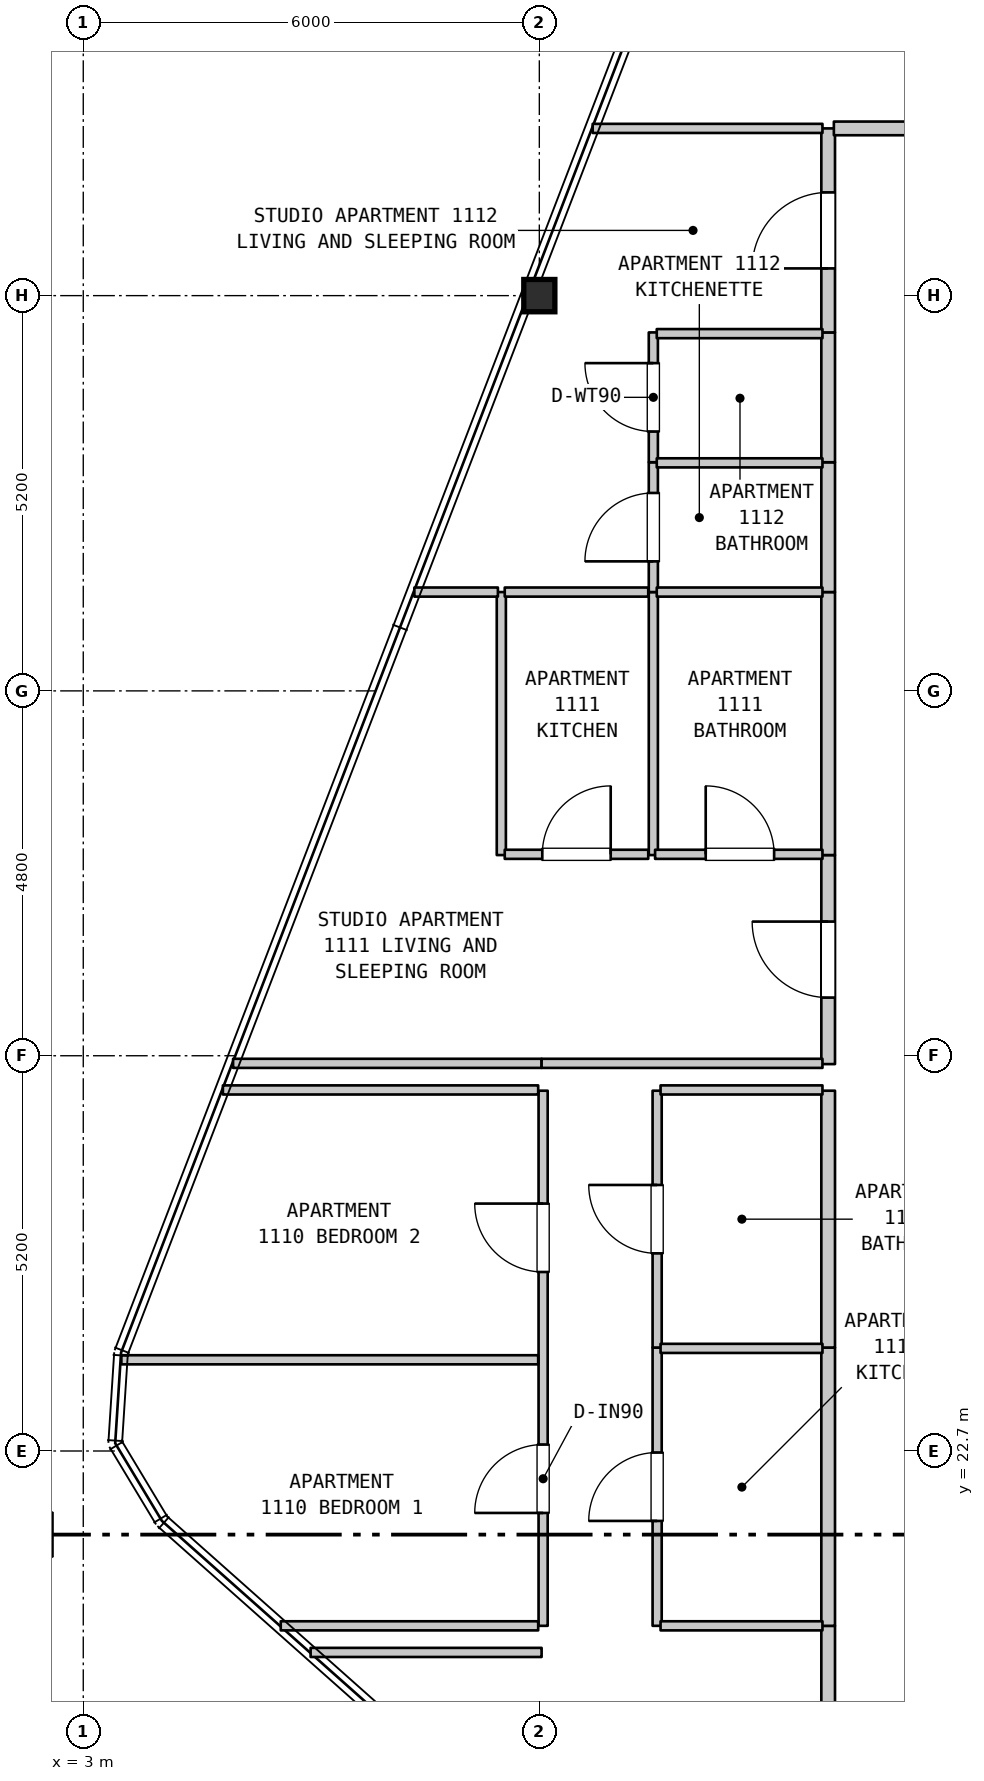
"""IFC4 building model, lengths in metres.
Left out: names, types, materials, properties, quantities, classifications, styles, units other than length and angle.
Written with IfcOpenShell. Run it as: python <this file> out.ifc"""

import sys

from ifc_helpers import new_model, si_unit, direction, frame, frame_2d, origin, origin_2d, place, context, subcontext, project, spatial, rectangle, i_section, extrude, element, fill, save


model = new_model("IFC4")
c1 = context("Model", 3, precision=1e-05, world=origin(), true_north=direction((0.0, 1.0)))
c2 = subcontext(c1, "Body", "Model", "MODEL_VIEW")
j1 = project(units=[si_unit("LENGTHUNIT", "METRE"), si_unit("PLANEANGLEUNIT", "RADIAN")], contexts=[c1])
p1 = place(None, origin())
s1 = spatial("IfcSite", under=j1, at=p1, CompositionType="ELEMENT")
p2 = place(p1, origin())
s2 = spatial("IfcBuilding", under=s1, at=p2, CompositionType="ELEMENT")
p3 = place(p2, frame((0.0, 0.0, 49.9)))
s3 = spatial("IfcBuildingStorey", under=s2, at=p3, CompositionType="ELEMENT", Elevation=49.9)
p4 = place(p3, frame((9.0, 37.9, 0.0), z_axis=(0.0, 0.0, 1.0), x_axis=(1.0, 0.0, 0.0)))
e1 = element("IfcColumn", 1, at=p4, inside=s3, PredefinedType="COLUMN", context=c2, shape_type="SweptSolid", body=[
    extrude(i_section(OverallWidth=0.409, OverallDepth=0.425, WebThickness=0.032, FlangeThickness=0.052, FilletRadius=0.015, at=origin_2d()), origin(), (0.0, 0.0, 1.0), 3.7),
])
p5 = place(p3, frame((8.5, 30.54, 0.0), z_axis=(0.0, 0.0, 1.0), x_axis=(0.0, 1.0, 0.0)))
e2 = element("IfcWall", 2, at=p5, inside=s3, PredefinedType="PARTITIONING", context=c2, shape_type="SweptSolid", body=[
    extrude(rectangle(XDim=3.46, YDim=0.12, at=frame_2d((1.73, 0.0))), origin(), (0.0, 0.0, 1.0), 3.385),
])
p6 = place(p3, frame((9.05, 20.4, 0.0), z_axis=(0.0, 0.0, 1.0), x_axis=(0.0, 1.0, 0.0)))
e3 = element("IfcWall", 3, at=p6, inside=s3, PredefinedType="PARTITIONING", context=c2, shape_type="SweptSolid", body=[
    extrude(rectangle(XDim=7.04, YDim=0.12, at=frame_2d((3.52, 0.0))), origin(), (0.0, 0.0, 1.0), 2.785),
])
p7 = place(p6, frame((1.485, 0.0, 0.0)))
e4 = element("IfcOpeningElement", 4, at=p7, cuts=e3, PredefinedType="OPENING", context=c2, shape_type="SweptSolid", body=[
    extrude(rectangle(XDim=0.9, YDim=2.15, at=frame_2d((0.45, 1.075))), frame((0.0, 0.07, 0.0), z_axis=(0.0, -1.0, 0.0), x_axis=(1.0, 0.0, 0.0)), (0.0, 0.0, 1.0), 0.14),
])
p8 = place(p6, frame((4.655, 0.0, 0.0)))
e5 = element("IfcOpeningElement", 5, at=p8, cuts=e3, PredefinedType="OPENING", context=c2, shape_type="SweptSolid", body=[
    extrude(rectangle(XDim=0.9, YDim=2.15, at=frame_2d((0.45, 1.075))), frame((0.0, 0.07, 0.0), z_axis=(0.0, -1.0, 0.0), x_axis=(1.0, 0.0, 0.0)), (0.0, 0.0, 1.0), 0.14),
])
p9 = place(p3, frame((10.5, 30.54, 0.0), z_axis=(0.0, 0.0, 1.0), x_axis=(0.0, 1.0, 0.0)))
e6 = element("IfcWall", 6, at=p9, inside=s3, PredefinedType="PARTITIONING", context=c2, shape_type="SweptSolid", body=[
    extrude(rectangle(XDim=3.46, YDim=0.12, at=frame_2d((1.73, 0.0))), origin(), (0.0, 0.0, 1.0), 3.385),
])
p10 = place(p3, frame((10.5, 34.0, 0.0), z_axis=(0.0, 0.0, 1.0), x_axis=(0.0, 1.0, 0.0)))
e7 = element("IfcWall", 7, at=p10, inside=s3, PredefinedType="PARTITIONING", context=c2, shape_type="SweptSolid", body=[
    extrude(rectangle(XDim=1.708, YDim=0.12, at=frame_2d((0.854, 0.0))), origin(), (0.0, 0.0, 1.0), 3.385),
])
p11 = place(p10, frame((0.404, 0.0, 0.0)))
e8 = element("IfcOpeningElement", 8, at=p11, cuts=e7, PredefinedType="OPENING", context=c2, shape_type="SweptSolid", body=[
    extrude(rectangle(XDim=0.9, YDim=2.15, at=frame_2d((0.45, 1.075))), frame((0.0, 0.07, 0.0), z_axis=(0.0, -1.0, 0.0), x_axis=(1.0, 0.0, 0.0)), (0.0, 0.0, 1.0), 0.14),
])
p12 = place(p3, frame((10.5, 35.708, 0.0), z_axis=(0.0, 0.0, 1.0), x_axis=(0.0, 1.0, 0.0)))
e9 = element("IfcWall", 9, at=p12, inside=s3, PredefinedType="PARTITIONING", context=c2, shape_type="SweptSolid", body=[
    extrude(rectangle(XDim=1.708, YDim=0.12, at=frame_2d((0.854, 0.0))), origin(), (0.0, 0.0, 1.0), 3.385),
])
p13 = place(p12, frame((0.404, 0.0, 0.0)))
e10 = element("IfcOpeningElement", 10, at=p13, cuts=e9, PredefinedType="OPENING", context=c2, shape_type="SweptSolid", body=[
    extrude(rectangle(XDim=0.9, YDim=2.1, at=frame_2d((0.45, 1.05))), frame((0.0, 0.07, 0.0), z_axis=(0.0, -1.0, 0.0), x_axis=(1.0, 0.0, 0.0)), (0.0, 0.0, 1.0), 0.14),
])
p14 = place(p3, frame((10.55, 20.4, 0.0), z_axis=(0.0, 0.0, 1.0), x_axis=(0.0, 1.0, 0.0)))
e11 = element("IfcWall", 11, at=p14, inside=s3, PredefinedType="PARTITIONING", context=c2, shape_type="SweptSolid", body=[
    extrude(rectangle(XDim=3.661, YDim=0.12, at=frame_2d((1.831, 0.0))), origin(), (0.0, 0.0, 1.0), 3.385),
])
p15 = place(p14, frame((1.38, 0.0, 0.0)))
e12 = element("IfcOpeningElement", 12, at=p15, cuts=e11, PredefinedType="OPENING", context=c2, shape_type="SweptSolid", body=[
    extrude(rectangle(XDim=0.9, YDim=2.15, at=frame_2d((0.45, 1.075))), frame((0.0, 0.07, 0.0), z_axis=(0.0, -1.0, 0.0), x_axis=(1.0, 0.0, 0.0)), (0.0, 0.0, 1.0), 0.14),
])
p16 = place(p3, frame((10.55, 24.061, 0.0), z_axis=(0.0, 0.0, 1.0), x_axis=(0.0, 1.0, 0.0)))
e13 = element("IfcWall", 13, at=p16, inside=s3, PredefinedType="PARTITIONING", context=c2, shape_type="SweptSolid", body=[
    extrude(rectangle(XDim=3.379, YDim=0.12, at=frame_2d((1.689, 0.0))), origin(), (0.0, 0.0, 1.0), 3.385),
])
p17 = place(p16, frame((1.239, 0.0, 0.0)))
e14 = element("IfcOpeningElement", 14, at=p17, cuts=e13, PredefinedType="OPENING", context=c2, shape_type="SweptSolid", body=[
    extrude(rectangle(XDim=0.9, YDim=2.1, at=frame_2d((0.45, 1.05))), frame((0.0, 0.07, 0.0), z_axis=(0.0, -1.0, 0.0), x_axis=(1.0, 0.0, 0.0)), (0.0, 0.0, 1.0), 0.14),
])
p18 = place(p3, frame((12.8, 17.3, 0.0), z_axis=(0.0, 0.0, 1.0), x_axis=(0.0, 1.0, 0.0)))
e15 = element("IfcWall", 15, at=p18, inside=s3, PredefinedType="STANDARD", context=c2, shape_type="SweptSolid", body=[
    extrude(rectangle(XDim=3.1, YDim=0.18, at=frame_2d((1.55, 0.0))), origin(), (0.0, 0.0, 1.0), 3.385),
])
p19 = place(p18, frame((0.978, 0.0, 0.0)))
e16 = element("IfcOpeningElement", 16, at=p19, cuts=e15, PredefinedType="OPENING", context=c2, shape_type="SweptSolid", body=[
    extrude(rectangle(XDim=1.0, YDim=2.15, at=frame_2d((0.5, 1.075))), frame((0.0, 0.1, 0.0), z_axis=(0.0, -1.0, 0.0), x_axis=(1.0, 0.0, 0.0)), (0.0, 0.0, 1.0), 0.2),
])
p20 = place(p3, frame((12.8, 20.4, 0.0), z_axis=(0.0, 0.0, 1.0), x_axis=(0.0, 1.0, 0.0)))
e17 = element("IfcWall", 17, at=p20, inside=s3, PredefinedType="STANDARD", context=c2, shape_type="SweptSolid", body=[
    extrude(rectangle(XDim=3.661, YDim=0.18, at=frame_2d((1.831, 0.0))), origin(), (0.0, 0.0, 1.0), 3.385),
])
p21 = place(p3, frame((12.8, 24.061, 0.0), z_axis=(0.0, 0.0, 1.0), x_axis=(0.0, 1.0, 0.0)))
e18 = element("IfcWall", 18, at=p21, inside=s3, PredefinedType="STANDARD", context=c2, shape_type="SweptSolid", body=[
    extrude(rectangle(XDim=3.379, YDim=0.18, at=frame_2d((1.689, 0.0))), origin(), (0.0, 0.0, 1.0), 3.385),
])
p22 = place(p3, frame((12.8, 27.79, 0.0), z_axis=(0.0, 0.0, 1.0), x_axis=(0.0, 1.0, 0.0)))
e19 = element("IfcWall", 19, at=p22, inside=s3, PredefinedType="STANDARD", context=c2, shape_type="SweptSolid", body=[
    extrude(rectangle(XDim=2.75, YDim=0.18, at=frame_2d((1.375, 0.0))), origin(), (0.0, 0.0, 1.0), 3.385),
])
p23 = place(p22, frame((0.875, 0.0, 0.0)))
e20 = element("IfcOpeningElement", 20, at=p23, cuts=e19, PredefinedType="OPENING", context=c2, shape_type="SweptSolid", body=[
    extrude(rectangle(XDim=1.0, YDim=2.15, at=frame_2d((0.5, 1.075))), frame((0.0, 0.1, 0.0), z_axis=(0.0, -1.0, 0.0), x_axis=(1.0, 0.0, 0.0)), (0.0, 0.0, 1.0), 0.2),
])
p24 = place(p3, frame((12.8, 30.54, 0.0), z_axis=(0.0, 0.0, 1.0), x_axis=(0.0, 1.0, 0.0)))
e21 = element("IfcWall", 21, at=p24, inside=s3, PredefinedType="STANDARD", context=c2, shape_type="SweptSolid", body=[
    extrude(rectangle(XDim=3.46, YDim=0.18, at=frame_2d((1.73, 0.0))), origin(), (0.0, 0.0, 1.0), 3.385),
])
for number, where, z_axis, x_axis in (
    (22, (12.8, 34.0, 0.0), (0.0, 0.0, 1.0), (0.0, 1.0, 0.0)),
    (23, (12.8, 35.708, 0.0), (0.0, 0.0, 1.0), (0.0, 1.0, 0.0)),
):
    element("IfcWall", number, at=place(p3, frame(where, z_axis=z_axis, x_axis=x_axis)), inside=s3, PredefinedType="STANDARD", context=c2, shape_type="SweptSolid", body=[
        extrude(rectangle(XDim=1.708, YDim=0.18, at=frame_2d((0.854, 0.0))), origin(), (0.0, 0.0, 1.0), 3.385),
    ])
p25 = place(p3, frame((12.8, 37.416, 0.0), z_axis=(0.0, 0.0, 1.0), x_axis=(0.0, 1.0, 0.0)))
e24 = element("IfcWall", 24, at=p25, inside=s3, PredefinedType="STANDARD", context=c2, shape_type="SweptSolid", body=[
    extrude(rectangle(XDim=2.684, YDim=0.18, at=frame_2d((1.342, 0.0))), origin(), (0.0, 0.0, 1.0), 3.385),
])
p26 = place(p25, frame((0.842, 0.0, 0.0)))
e25 = element("IfcOpeningElement", 25, at=p26, cuts=e24, PredefinedType="OPENING", context=c2, shape_type="SweptSolid", body=[
    extrude(rectangle(XDim=1.0, YDim=2.15, at=frame_2d((0.5, 1.075))), frame((0.0, 0.1, 0.0), z_axis=(0.0, -1.0, 0.0), x_axis=(1.0, 0.0, 0.0)), (0.0, 0.0, 1.0), 0.2),
])
p27 = place(p3, frame((5.991, 20.05, 0.0), z_axis=(0.0, 0.0, 1.0), x_axis=(1.0, 0.0, 0.0)))
e26 = element("IfcWall", 26, at=p27, inside=s3, PredefinedType="PARTITIONING", context=c2, shape_type="SweptSolid", body=[
    extrude(rectangle(XDim=3.039, YDim=0.12, at=frame_2d((1.52, 0.0))), origin(), (0.0, 0.0, 1.0), 3.385),
])
p28 = place(p3, frame((5.598, 20.4, 0.0), z_axis=(0.0, 0.0, 1.0), x_axis=(1.0, 0.0, 0.0)))
e27 = element("IfcWall", 27, at=p28, inside=s3, PredefinedType="PARTITIONING", context=c2, shape_type="SweptSolid", body=[
    extrude(rectangle(XDim=3.387, YDim=0.12, at=frame_2d((1.694, 0.0))), origin(), (0.0, 0.0, 1.0), 3.385),
])
p29 = place(p3, frame((10.595, 20.4, 0.0), z_axis=(0.0, 0.0, 1.0), x_axis=(1.0, 0.0, 0.0)))
e28 = element("IfcWall", 28, at=p29, inside=s3, PredefinedType="PARTITIONING", context=c2, shape_type="SweptSolid", body=[
    extrude(rectangle(XDim=2.13, YDim=0.12, at=frame_2d((1.065, 0.0))), origin(), (0.0, 0.0, 1.0), 3.385),
])
p30 = place(p3, frame((3.501, 23.9, 0.0), z_axis=(0.0, 0.0, 1.0), x_axis=(1.0, 0.0, 0.0)))
e29 = element("IfcWall", 29, at=p30, inside=s3, PredefinedType="PARTITIONING", context=c2, shape_type="SweptSolid", body=[
    extrude(rectangle(XDim=5.484, YDim=0.12, at=frame_2d((2.742, 0.0))), origin(), (0.0, 0.0, 1.0), 3.385),
])
p31 = place(p3, frame((10.595, 24.05, 0.0), z_axis=(0.0, 0.0, 1.0), x_axis=(1.0, 0.0, 0.0)))
e30 = element("IfcWall", 30, at=p31, inside=s3, PredefinedType="PARTITIONING", context=c2, shape_type="SweptSolid", body=[
    extrude(rectangle(XDim=2.13, YDim=0.12, at=frame_2d((1.065, 0.0))), origin(), (0.0, 0.0, 1.0), 3.385),
])
p32 = place(p3, frame((4.837, 27.45, 0.0), z_axis=(0.0, 0.0, 1.0), x_axis=(1.0, 0.0, 0.0)))
e31 = element("IfcWall", 31, at=p32, inside=s3, PredefinedType="PARTITIONING", context=c2, shape_type="SweptSolid", body=[
    extrude(rectangle(XDim=4.148, YDim=0.12, at=frame_2d((2.074, 0.0))), origin(), (0.0, 0.0, 1.0), 3.385),
])
p33 = place(p3, frame((10.595, 27.45, 0.0), z_axis=(0.0, 0.0, 1.0), x_axis=(1.0, 0.0, 0.0)))
e32 = element("IfcWall", 32, at=p33, inside=s3, PredefinedType="PARTITIONING", context=c2, shape_type="SweptSolid", body=[
    extrude(rectangle(XDim=2.13, YDim=0.12, at=frame_2d((1.065, 0.0))), origin(), (0.0, 0.0, 1.0), 3.385),
])
p34 = place(p3, frame((4.971, 27.8, 0.0), z_axis=(0.0, 0.0, 1.0), x_axis=(1.0, 0.0, 0.0)))
e33 = element("IfcWall", 33, at=p34, inside=s3, PredefinedType="PARTITIONING", context=c2, shape_type="SweptSolid", body=[
    extrude(rectangle(XDim=4.059, YDim=0.12, at=frame_2d((2.03, 0.0))), origin(), (0.0, 0.0, 1.0), 3.385),
])
p35 = place(p3, frame((9.03, 27.8, 0.0), z_axis=(0.0, 0.0, 1.0), x_axis=(1.0, 0.0, 0.0)))
e34 = element("IfcWall", 34, at=p35, inside=s3, PredefinedType="PARTITIONING", context=c2, shape_type="SweptSolid", body=[
    extrude(rectangle(XDim=3.695, YDim=0.12, at=frame_2d((1.848, 0.0))), origin(), (0.0, 0.0, 1.0), 3.385),
])
p36 = place(p3, frame((8.545, 30.55, 0.0), z_axis=(0.0, 0.0, 1.0), x_axis=(1.0, 0.0, 0.0)))
e35 = element("IfcWall", 35, at=p36, inside=s3, PredefinedType="PARTITIONING", context=c2, shape_type="SweptSolid", body=[
    extrude(rectangle(XDim=1.888, YDim=0.12, at=frame_2d((0.944, 0.0))), origin(), (0.0, 0.0, 1.0), 3.385),
])
p37 = place(p36, frame((0.494, 0.0, 0.0)))
e36 = element("IfcOpeningElement", 36, at=p37, cuts=e35, PredefinedType="OPENING", context=c2, shape_type="SweptSolid", body=[
    extrude(rectangle(XDim=0.9, YDim=2.15, at=frame_2d((0.45, 1.075))), frame((0.0, 0.07, 0.0), z_axis=(0.0, -1.0, 0.0), x_axis=(1.0, 0.0, 0.0)), (0.0, 0.0, 1.0), 0.14),
])
p38 = place(p3, frame((10.523, 30.55, 0.0), z_axis=(0.0, 0.0, 1.0), x_axis=(1.0, 0.0, 0.0)))
e37 = element("IfcWall", 37, at=p38, inside=s3, PredefinedType="PARTITIONING", context=c2, shape_type="SweptSolid", body=[
    extrude(rectangle(XDim=2.202, YDim=0.12, at=frame_2d((1.101, 0.0))), origin(), (0.0, 0.0, 1.0), 3.385),
])
p39 = place(p38, frame((0.666, 0.0, 0.0)))
e38 = element("IfcOpeningElement", 38, at=p39, cuts=e37, PredefinedType="OPENING", context=c2, shape_type="SweptSolid", body=[
    extrude(rectangle(XDim=0.9, YDim=2.1, at=frame_2d((0.45, 1.05))), frame((0.0, 0.07, 0.0), z_axis=(0.0, -1.0, 0.0), x_axis=(1.0, 0.0, 0.0)), (0.0, 0.0, 1.0), 0.14),
])
p40 = place(p3, frame((7.356, 34.0, 0.0), z_axis=(0.0, 0.0, 1.0), x_axis=(1.0, 0.0, 0.0)))
e39 = element("IfcWall", 39, at=p40, inside=s3, PredefinedType="PARTITIONING", context=c2, shape_type="SweptSolid", body=[
    extrude(rectangle(XDim=1.099, YDim=0.12, at=frame_2d((0.55, 0.0))), origin(), (0.0, 0.0, 1.0), 3.385),
])
p41 = place(p3, frame((8.545, 34.0, 0.0), z_axis=(0.0, 0.0, 1.0), x_axis=(1.0, 0.0, 0.0)))
e40 = element("IfcWall", 40, at=p41, inside=s3, PredefinedType="PARTITIONING", context=c2, shape_type="SweptSolid", body=[
    extrude(rectangle(XDim=1.888, YDim=0.12, at=frame_2d((0.944, 0.0))), origin(), (0.0, 0.0, 1.0), 3.385),
])
for number, where, z_axis, x_axis in (
    (41, (10.545, 34.0, 0.0), (0.0, 0.0, 1.0), (1.0, 0.0, 0.0)),
    (42, (10.545, 35.7, 0.0), (0.0, 0.0, 1.0), (1.0, 0.0, 0.0)),
    (43, (10.545, 37.4, 0.0), (0.0, 0.0, 1.0), (1.0, 0.0, 0.0)),
):
    element("IfcWall", number, at=place(p3, frame(where, z_axis=z_axis, x_axis=x_axis)), inside=s3, PredefinedType="PARTITIONING", context=c2, shape_type="SweptSolid", body=[
        extrude(rectangle(XDim=2.18, YDim=0.12, at=frame_2d((1.09, 0.0))), origin(), (0.0, 0.0, 1.0), 3.385),
    ])
p42 = place(p3, frame((9.702, 40.1, 0.0), z_axis=(0.0, 0.0, 1.0), x_axis=(1.0, 0.0, 0.0)))
e44 = element("IfcWall", 44, at=p42, inside=s3, PredefinedType="PARTITIONING", context=c2, shape_type="SweptSolid", body=[
    extrude(rectangle(XDim=3.023, YDim=0.12, at=frame_2d((1.512, 0.0))), origin(), (0.0, 0.0, 1.0), 3.385),
])
p43 = place(p3, frame((12.875, 40.1, 0.0), z_axis=(0.0, 0.0, 1.0), x_axis=(1.0, 0.0, 0.0)))
e45 = element("IfcWall", 45, at=p43, inside=s3, PredefinedType="STANDARD", context=c2, shape_type="SweptSolid", body=[
    extrude(rectangle(XDim=1.48, YDim=0.18, at=frame_2d((0.74, 0.0))), origin(), (0.0, 0.0, 1.0), 3.385),
])
p44 = place(p7, origin())
e46 = element("IfcDoor", 46, at=p44, inside=s3, OperationType="SINGLE_SWING_LEFT", PredefinedType="DOOR", context=c2, shape_type="SweptSolid", body=[
    extrude(rectangle(XDim=0.9, YDim=2.15, at=frame_2d((0.45, 1.075))), frame((0.0, 0.025, 0.0), z_axis=(0.0, -1.0, 0.0), x_axis=(1.0, 0.0, 0.0)), (0.0, 0.0, 1.0), 0.05),
])
fill(e4, e46)
p45 = place(p8, origin())
e47 = element("IfcDoor", 47, at=p45, inside=s3, OperationType="SINGLE_SWING_RIGHT", PredefinedType="DOOR", context=c2, shape_type="SweptSolid", body=[
    extrude(rectangle(XDim=0.9, YDim=2.15, at=frame_2d((0.45, 1.075))), frame((0.0, 0.025, 0.0), z_axis=(0.0, -1.0, 0.0), x_axis=(1.0, 0.0, 0.0)), (0.0, 0.0, 1.0), 0.05),
])
fill(e5, e47)
p46 = place(p11, origin())
e48 = element("IfcDoor", 48, at=p46, inside=s3, OperationType="SINGLE_SWING_LEFT", PredefinedType="DOOR", context=c2, shape_type="SweptSolid", body=[
    extrude(rectangle(XDim=0.9, YDim=2.15, at=frame_2d((0.45, 1.075))), frame((0.0, 0.025, 0.0), z_axis=(0.0, -1.0, 0.0), x_axis=(1.0, 0.0, 0.0)), (0.0, 0.0, 1.0), 0.05),
])
fill(e8, e48)
p47 = place(p13, origin())
e49 = element("IfcDoor", 49, at=p47, inside=s3, OperationType="SINGLE_SWING_RIGHT", PredefinedType="DOOR", context=c2, shape_type="SweptSolid", body=[
    extrude(rectangle(XDim=0.9, YDim=2.1, at=frame_2d((0.45, 1.05))), frame((0.0, 0.025, 0.0), z_axis=(0.0, -1.0, 0.0), x_axis=(1.0, 0.0, 0.0)), (0.0, 0.0, 1.0), 0.05),
])
fill(e10, e49)
p48 = place(p15, origin())
e50 = element("IfcDoor", 50, at=p48, inside=s3, OperationType="SINGLE_SWING_LEFT", PredefinedType="DOOR", context=c2, shape_type="SweptSolid", body=[
    extrude(rectangle(XDim=0.9, YDim=2.15, at=frame_2d((0.45, 1.075))), frame((0.0, 0.025, 0.0), z_axis=(0.0, -1.0, 0.0), x_axis=(1.0, 0.0, 0.0)), (0.0, 0.0, 1.0), 0.05),
])
fill(e12, e50)
p49 = place(p17, origin())
e51 = element("IfcDoor", 51, at=p49, inside=s3, OperationType="SINGLE_SWING_RIGHT", PredefinedType="DOOR", context=c2, shape_type="SweptSolid", body=[
    extrude(rectangle(XDim=0.9, YDim=2.1, at=frame_2d((0.45, 1.05))), frame((0.0, 0.025, 0.0), z_axis=(0.0, -1.0, 0.0), x_axis=(1.0, 0.0, 0.0)), (0.0, 0.0, 1.0), 0.05),
])
fill(e14, e51)
p50 = place(p23, origin())
e52 = element("IfcDoor", 52, at=p50, inside=s3, OperationType="SINGLE_SWING_RIGHT", PredefinedType="DOOR", context=c2, shape_type="SweptSolid", body=[
    extrude(rectangle(XDim=1.0, YDim=2.15, at=frame_2d((0.5, 1.075))), frame((0.0, 0.025, 0.0), z_axis=(0.0, -1.0, 0.0), x_axis=(1.0, 0.0, 0.0)), (0.0, 0.0, 1.0), 0.05),
])
fill(e20, e52)
p51 = place(p26, origin())
e53 = element("IfcDoor", 53, at=p51, inside=s3, OperationType="SINGLE_SWING_LEFT", PredefinedType="DOOR", context=c2, shape_type="SweptSolid", body=[
    extrude(rectangle(XDim=1.0, YDim=2.15, at=frame_2d((0.5, 1.075))), frame((0.0, 0.025, 0.0), z_axis=(0.0, -1.0, 0.0), x_axis=(1.0, 0.0, 0.0)), (0.0, 0.0, 1.0), 0.05),
])
fill(e25, e53)
p52 = place(p37, origin())
e54 = element("IfcDoor", 54, at=p52, inside=s3, OperationType="SINGLE_SWING_RIGHT", PredefinedType="DOOR", context=c2, shape_type="SweptSolid", body=[
    extrude(rectangle(XDim=0.9, YDim=2.15, at=frame_2d((0.45, 1.075))), frame((0.0, 0.025, 0.0), z_axis=(0.0, -1.0, 0.0), x_axis=(1.0, 0.0, 0.0)), (0.0, 0.0, 1.0), 0.05),
])
fill(e36, e54)
p53 = place(p39, origin())
e55 = element("IfcDoor", 55, at=p53, inside=s3, OperationType="SINGLE_SWING_LEFT", PredefinedType="DOOR", context=c2, shape_type="SweptSolid", body=[
    extrude(rectangle(XDim=0.9, YDim=2.1, at=frame_2d((0.45, 1.05))), frame((0.0, 0.025, 0.0), z_axis=(0.0, -1.0, 0.0), x_axis=(1.0, 0.0, 0.0)), (0.0, 0.0, 1.0), 0.05),
])
fill(e38, e55)
save(model, sys.argv[1])
